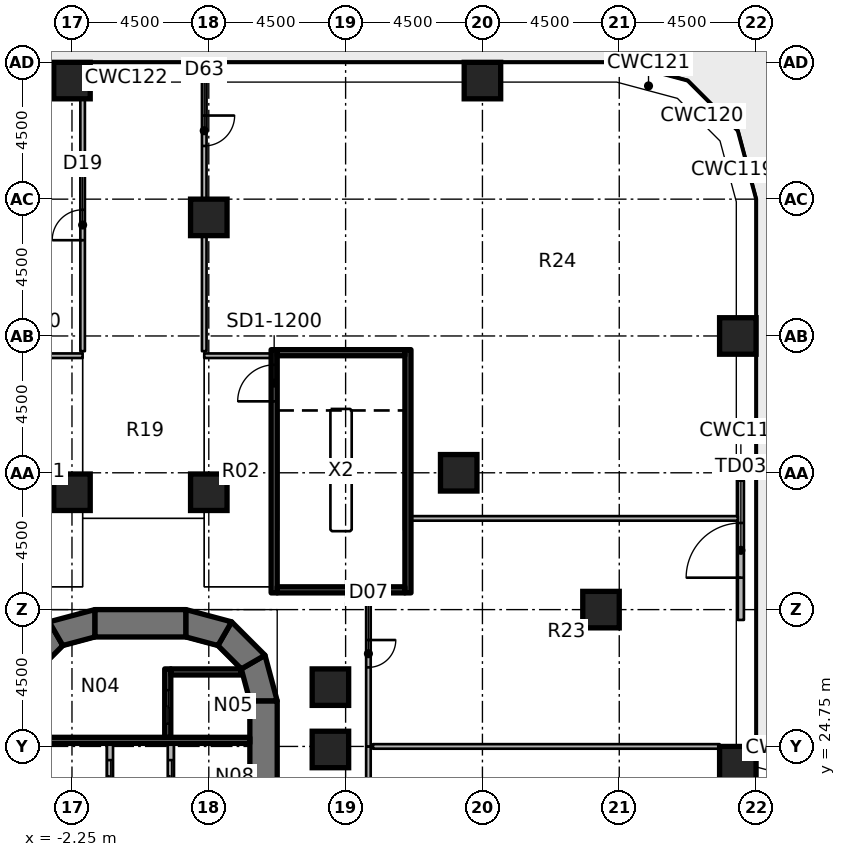
"""IFC4 building model, lengths in metres.
Left out: names, types, materials, properties, quantities, classifications, styles, units other than length and angle.
Written with IfcOpenShell. Run it as: python <this file> out.ifc"""

import sys

from ifc_helpers import new_model, si_unit, direction, frame, frame_2d, origin, origin_2d, place, context, subcontext, project, spatial, polyline, rectangle, outline, extrude, element, fill, save


model = new_model("IFC4")
c1 = context("Model", 3, precision=1e-05, world=origin(), true_north=direction((0.0, 1.0)))
c2 = subcontext(c1, "Body", "Model", "MODEL_VIEW")
j1 = project(units=[si_unit("LENGTHUNIT", "METRE"), si_unit("PLANEANGLEUNIT", "RADIAN")], contexts=[c1])
p1 = place(None, origin())
s1 = spatial("IfcSite", under=j1, at=p1, CompositionType="ELEMENT")
p2 = place(p1, origin())
s2 = spatial("IfcBuilding", under=s1, at=p2, CompositionType="ELEMENT")
p3 = place(p2, frame((0.0, 0.0, 12.0)))
s3 = spatial("IfcBuildingStorey", under=s2, at=p3, CompositionType="ELEMENT", Elevation=12.0)
for number, where, z_axis, x_axis in (
    (1, (-2.25, 33.11, 0.0), (0.0, 0.0, 1.0), (1.0, 0.0, 0.0)),
    (2, (-2.25, 46.65, 0.0), (0.0, 0.0, 1.0), (1.0, 0.0, 0.0)),
    (3, (2.25, 33.11, 0.0), (0.0, 0.0, 1.0), (1.0, 0.0, 0.0)),
    (4, (2.25, 42.15, 0.0), (0.0, 0.0, 1.0), (1.0, 0.0, 0.0)),
    (5, (6.25, 24.65, 0.0), (0.0, 0.0, 1.0), (1.0, 0.0, 0.0)),
    (6, (6.25, 26.7, 0.0), (0.0, 0.0, 1.0), (1.0, 0.0, 0.0)),
    (7, (10.47, 33.75, 0.0), (0.0, 0.0, 1.0), (1.0, 0.0, 0.0)),
    (8, (11.25, 46.65, 0.0), (0.0, 0.0, 1.0), (1.0, 0.0, 0.0)),
    (9, (15.15, 29.25, 0.0), (0.0, 0.0, 1.0), (1.0, 0.0, 0.0)),
    (10, (19.65, 24.15, 0.0), (0.0, 0.0, 1.0), (1.0, 0.0, 0.0)),
    (11, (19.65, 38.25, 0.0), (0.0, 0.0, 1.0), (1.0, 0.0, 0.0)),
):
    element("IfcColumn", number, at=place(p3, frame(where, z_axis=z_axis, x_axis=x_axis)), inside=s3, PredefinedType="COLUMN", context=c2, shape_type="SweptSolid", body=[
        extrude(rectangle(XDim=1.2, YDim=1.2, at=origin_2d()), origin(), (0.0, 0.0, 1.0), 4.55),
    ])
p4 = place(p3, frame((4.05, 11.25, 0.0), z_axis=(0.0, 0.0, 1.0), x_axis=(0.0, 1.0, 0.0)))
e12 = element("IfcWall", 12, at=p4, inside=s3, PredefinedType="SHEAR", context=c2, shape_type="SweptSolid", body=[
    extrude(rectangle(XDim=15.0, YDim=0.9, at=frame_2d((7.5, 0.0))), origin(), (0.0, 0.0, 1.0), 5.0),
])
p5 = place(p4, frame((7.15, 0.0, 0.0)))
e13 = element("IfcOpeningElement", 13, at=p5, cuts=e12, PredefinedType="OPENING", context=c2, shape_type="SweptSolid", body=[
    extrude(rectangle(XDim=1.5, YDim=2.3, at=frame_2d((0.75, 1.15))), frame((0.0, 0.46, 0.0), z_axis=(0.0, -1.0, 0.0), x_axis=(1.0, 0.0, 0.0)), (0.0, 0.0, 1.0), 0.92),
])
p6 = place(p4, frame((5.55, 0.0, 0.0)))
e14 = element("IfcOpeningElement", 14, at=p6, cuts=e12, PredefinedType="OPENING", context=c2, shape_type="SweptSolid", body=[
    extrude(rectangle(XDim=1.2, YDim=2.1, at=frame_2d((0.6, 1.05))), frame((0.0, 0.46, 0.0), z_axis=(0.0, -1.0, 0.0), x_axis=(1.0, 0.0, 0.0)), (0.0, 0.0, 1.0), 0.92),
])
p7 = place(p3, frame((-1.5, 28.8, 0.0), z_axis=(0.0, 0.0, 1.0), x_axis=(1.0, 0.0, 0.0)))
e15 = element("IfcWall", 15, at=p7, inside=s3, PredefinedType="SHEAR", context=c2, shape_type="SweptSolid", body=[
    extrude(rectangle(XDim=3.0, YDim=0.9, at=frame_2d((1.5, 0.0))), origin(), (0.0, 0.0, 1.0), 5.0),
])
p8 = place(p3, origin())
e16 = element("IfcWall", 16, at=p8, inside=s3, PredefinedType="SHEAR", context=c2, shape_type="SweptSolid", body=[
    extrude(outline(polyline([(-4.098, 27.75), (-3.0, 28.848), (-2.55, 28.069), (-3.319, 27.3), (-4.098, 27.75)])), origin(), (0.0, 0.0, 1.0), 5.0),
])
p9 = place(p3, origin())
e17 = element("IfcWall", 17, at=p9, inside=s3, PredefinedType="SHEAR", context=c2, shape_type="SweptSolid", body=[
    extrude(outline(polyline([(-3.0, 28.848), (-1.5, 29.25), (-1.5, 28.35), (-2.55, 28.069), (-3.0, 28.848)])), origin(), (0.0, 0.0, 1.0), 5.0),
])
p10 = place(p3, origin())
e18 = element("IfcWall", 18, at=p10, inside=s3, PredefinedType="SHEAR", context=c2, shape_type="SweptSolid", body=[
    extrude(outline(polyline([(4.5, 26.25), (4.098, 27.75), (3.319, 27.3), (3.6, 26.25), (4.5, 26.25)])), origin(), (0.0, 0.0, 1.0), 5.0),
])
p11 = place(p3, origin())
e19 = element("IfcWall", 19, at=p11, inside=s3, PredefinedType="SHEAR", context=c2, shape_type="SweptSolid", body=[
    extrude(outline(polyline([(4.098, 27.75), (3.0, 28.848), (2.55, 28.069), (3.319, 27.3), (4.098, 27.75)])), origin(), (0.0, 0.0, 1.0), 5.0),
])
p12 = place(p3, origin())
e20 = element("IfcWall", 20, at=p12, inside=s3, PredefinedType="SHEAR", context=c2, shape_type="SweptSolid", body=[
    extrude(outline(polyline([(3.0, 28.848), (1.5, 29.25), (1.5, 28.35), (2.55, 28.069), (3.0, 28.848)])), origin(), (0.0, 0.0, 1.0), 5.0),
])
p13 = place(p3, frame((19.75, 28.91, 0.0), z_axis=(0.0, 0.0, 1.0), x_axis=(0.0, 1.0, 0.0)))
e21 = element("IfcWall", 21, at=p13, inside=s3, PredefinedType="SOLIDWALL", context=c2, shape_type="SweptSolid", body=[
    extrude(rectangle(XDim=4.58, YDim=0.2, at=frame_2d((2.29, 0.0))), origin(), (0.0, 0.0, 1.0), 4.55),
])
p14 = place(p13, frame((1.39, 0.0, 0.0)))
e22 = element("IfcOpeningElement", 22, at=p14, cuts=e21, PredefinedType="OPENING", context=c2, shape_type="SweptSolid", body=[
    extrude(rectangle(XDim=1.8, YDim=2.4, at=frame_2d((0.9, 1.2))), frame((0.0, 0.11, 0.0), z_axis=(0.0, -1.0, 0.0), x_axis=(1.0, 0.0, 0.0)), (0.0, 0.0, 1.0), 0.22),
])
p15 = place(p3, frame((-3.6, 24.95, 0.0), z_axis=(0.0, 0.0, 1.0), x_axis=(1.0, 0.0, 0.0)))
e23 = element("IfcWall", 23, at=p15, inside=s3, PredefinedType="SHEAR", context=c2, shape_type="SweptSolid", body=[
    extrude(rectangle(XDim=7.2, YDim=0.2, at=frame_2d((3.6, 0.0))), origin(), (0.0, 0.0, 1.0), 4.55),
])
p16 = place(p3, frame((0.9, 27.3, 0.0), z_axis=(0.0, 0.0, 1.0), x_axis=(0.0, -1.0, 0.0)))
e24 = element("IfcWall", 24, at=p16, inside=s3, PredefinedType="SHEAR", context=c2, shape_type="SweptSolid", body=[
    extrude(rectangle(XDim=2.25, YDim=0.2, at=frame_2d((1.125, 0.0))), origin(), (0.0, 0.0, 1.0), 4.55),
])
p17 = place(p16, frame((0.7, 0.0, 0.0)))
e25 = element("IfcOpeningElement", 25, at=p17, cuts=e24, PredefinedType="OPENING", context=c2, shape_type="SweptSolid", body=[
    extrude(rectangle(XDim=1.1, YDim=2.3, at=frame_2d((0.55, 1.15))), frame((0.0, 0.11, 0.0), z_axis=(0.0, -1.0, 0.0), x_axis=(1.0, 0.0, 0.0)), (0.0, 0.0, 1.0), 0.22),
])
p18 = place(p3, origin())
e26 = element("IfcWall", 26, at=p18, inside=s3, PredefinedType="SHEAR", context=c2, shape_type="SweptSolid", body=[
    extrude(outline(polyline([(1.0, 27.1), (3.341, 27.1), (3.291, 27.284), (3.275, 27.3), (1.0, 27.3), (1.0, 27.1)])), origin(), (0.0, 0.0, 1.0), 4.55),
])
p19 = place(p3, frame((-1.0, 24.85, 0.0), z_axis=(0.0, 0.0, 1.0), x_axis=(0.0, -1.0, 0.0)))
e27 = element("IfcWall", 27, at=p19, inside=s3, PredefinedType="PARTITIONING", context=c2, shape_type="SweptSolid", body=[
    extrude(rectangle(XDim=4.6, YDim=0.2, at=frame_2d((2.3, 0.0))), origin(), (0.0, 0.0, 1.0), 4.55),
])
p20 = place(p19, frame((0.55, 0.0, 0.0)))
e28 = element("IfcOpeningElement", 28, at=p20, cuts=e27, PredefinedType="OPENING", context=c2, shape_type="SweptSolid", body=[
    extrude(rectangle(XDim=1.1, YDim=2.3, at=frame_2d((0.55, 1.15))), frame((0.0, 0.11, 0.0), z_axis=(0.0, -1.0, 0.0), x_axis=(1.0, 0.0, 0.0)), (0.0, 0.0, 1.0), 0.22),
])
p21 = place(p19, frame((2.95, 0.0, 0.0)))
e29 = element("IfcOpeningElement", 29, at=p21, cuts=e27, PredefinedType="OPENING", context=c2, shape_type="SweptSolid", body=[
    extrude(rectangle(XDim=1.1, YDim=2.3, at=frame_2d((0.55, 1.15))), frame((0.0, 0.11, 0.0), z_axis=(0.0, -1.0, 0.0), x_axis=(1.0, 0.0, 0.0)), (0.0, 0.0, 1.0), 0.22),
])
p22 = place(p3, frame((1.0, 24.85, 0.0), z_axis=(0.0, 0.0, 1.0), x_axis=(0.0, -1.0, 0.0)))
e30 = element("IfcWall", 30, at=p22, inside=s3, PredefinedType="PARTITIONING", context=c2, shape_type="SweptSolid", body=[
    extrude(rectangle(XDim=4.6, YDim=0.2, at=frame_2d((2.3, 0.0))), origin(), (0.0, 0.0, 1.0), 4.55),
])
p23 = place(p22, frame((0.55, 0.0, 0.0)))
e31 = element("IfcOpeningElement", 31, at=p23, cuts=e30, PredefinedType="OPENING", context=c2, shape_type="SweptSolid", body=[
    extrude(rectangle(XDim=1.1, YDim=2.3, at=frame_2d((0.55, 1.15))), frame((0.0, 0.11, 0.0), z_axis=(0.0, -1.0, 0.0), x_axis=(1.0, 0.0, 0.0)), (0.0, 0.0, 1.0), 0.22),
])
p24 = place(p22, frame((3.05, 0.0, 0.0)))
e32 = element("IfcOpeningElement", 32, at=p24, cuts=e30, PredefinedType="OPENING", context=c2, shape_type="SweptSolid", body=[
    extrude(rectangle(XDim=0.9, YDim=2.1, at=frame_2d((0.45, 1.05))), frame((0.0, 0.11, 0.0), z_axis=(0.0, -1.0, 0.0), x_axis=(1.0, 0.0, 0.0)), (0.0, 0.0, 1.0), 0.22),
])
p25 = place(p3, frame((4.4, 29.8, 0.0), z_axis=(0.0, 0.0, 1.0), x_axis=(0.0, 1.0, 0.0)))
e33 = element("IfcWall", 33, at=p25, inside=s3, PredefinedType="SHEAR", context=c2, shape_type="SweptSolid", body=[
    extrude(rectangle(XDim=8.0, YDim=0.2, at=frame_2d((4.0, 0.0))), origin(), (0.0, 0.0, 1.0), 4.55),
])
p26 = place(p25, frame((6.3, 0.0, 0.0)))
e34 = element("IfcOpeningElement", 34, at=p26, cuts=e33, PredefinedType="OPENING", context=c2, shape_type="SweptSolid", body=[
    extrude(rectangle(XDim=1.2, YDim=2.1, at=frame_2d((0.6, 1.05))), frame((0.0, 0.11, 0.0), z_axis=(0.0, -1.0, 0.0), x_axis=(1.0, 0.0, 0.0)), (0.0, 0.0, 1.0), 0.22),
])
p27 = place(p3, frame((8.8, 29.8, 0.0), z_axis=(0.0, 0.0, 1.0), x_axis=(0.0, 1.0, 0.0)))
e35 = element("IfcWall", 35, at=p27, inside=s3, PredefinedType="SHEAR", context=c2, shape_type="SweptSolid", body=[
    extrude(rectangle(XDim=8.0, YDim=0.2, at=frame_2d((4.0, 0.0))), origin(), (0.0, 0.0, 1.0), 4.55),
])
for number, where, z_axis, x_axis in (
    (36, (4.5, 29.9, 0.0), (0.0, 0.0, 1.0), (1.0, 0.0, 0.0)),
    (37, (4.5, 37.7, 0.0), (0.0, 0.0, 1.0), (1.0, 0.0, 0.0)),
):
    element("IfcWall", number, at=place(p3, frame(where, z_axis=z_axis, x_axis=x_axis)), inside=s3, PredefinedType="SHEAR", context=c2, shape_type="SweptSolid", body=[
        extrude(rectangle(XDim=4.2, YDim=0.2, at=frame_2d((2.1, 0.0))), origin(), (0.0, 0.0, 1.0), 4.55),
    ])
p28 = place(p3, frame((-4.1, 37.6, 0.0), z_axis=(0.0, 0.0, 1.0), x_axis=(1.0, 0.0, 0.0)))
e38 = element("IfcWall", 38, at=p28, inside=s3, PredefinedType="PARTITIONING", context=c2, shape_type="SweptSolid", body=[
    extrude(rectangle(XDim=2.2, YDim=0.15, at=frame_2d((1.1, 0.0))), origin(), (0.0, 0.0, 1.0), 4.55),
])
p29 = place(p3, frame((2.1, 37.6, 0.0), z_axis=(0.0, 0.0, 1.0), x_axis=(1.0, 0.0, 0.0)))
e39 = element("IfcWall", 39, at=p29, inside=s3, PredefinedType="PARTITIONING", context=c2, shape_type="SweptSolid", body=[
    extrude(rectangle(XDim=2.2, YDim=0.15, at=frame_2d((1.1, 0.0))), origin(), (0.0, 0.0, 1.0), 4.55),
])
p30 = place(p3, frame((7.5, 24.75, 0.0), z_axis=(0.0, 0.0, 1.0), x_axis=(0.0, -1.0, 0.0)))
e40 = element("IfcWall", 40, at=p30, inside=s3, PredefinedType="PARTITIONING", context=c2, shape_type="SweptSolid", body=[
    extrude(rectangle(XDim=16.5, YDim=0.15, at=frame_2d((8.25, 0.0))), origin(), (0.0, 0.0, 1.0), 4.55),
])
p31 = place(p30, frame((10.5, 0.0, 0.0)))
e41 = element("IfcOpeningElement", 41, at=p31, cuts=e40, PredefinedType="OPENING", context=c2, shape_type="SweptSolid", body=[
    extrude(rectangle(XDim=1.0, YDim=2.1, at=frame_2d((0.5, 1.05))), frame((0.0, 0.085, 0.0), z_axis=(0.0, -1.0, 0.0), x_axis=(1.0, 0.0, 0.0)), (0.0, 0.0, 1.0), 0.17),
])
p32 = place(p3, frame((7.5, 30.0, 0.0), z_axis=(0.0, 0.0, 1.0), x_axis=(0.0, -1.0, 0.0)))
e42 = element("IfcWall", 42, at=p32, inside=s3, PredefinedType="PARTITIONING", context=c2, shape_type="SweptSolid", body=[
    extrude(rectangle(XDim=5.25, YDim=0.15, at=frame_2d((2.625, 0.0))), origin(), (0.0, 0.0, 1.0), 4.55),
])
p33 = place(p32, frame((1.75, 0.0, 0.0)))
e43 = element("IfcOpeningElement", 43, at=p33, cuts=e42, PredefinedType="OPENING", context=c2, shape_type="SweptSolid", body=[
    extrude(rectangle(XDim=0.9, YDim=2.1, at=frame_2d((0.45, 1.05))), frame((0.0, 0.085, 0.0), z_axis=(0.0, -1.0, 0.0), x_axis=(1.0, 0.0, 0.0)), (0.0, 0.0, 1.0), 0.17),
])
p34 = place(p3, frame((2.1, 46.65, 0.0), z_axis=(0.0, 0.0, 1.0), x_axis=(0.0, -1.0, 0.0)))
e44 = element("IfcWall", 44, at=p34, inside=s3, PredefinedType="PARTITIONING", context=c2, shape_type="SweptSolid", body=[
    extrude(rectangle(XDim=3.9, YDim=0.15, at=frame_2d((1.95, 0.0))), origin(), (0.0, 0.0, 1.0), 4.55),
])
p35 = place(p34, frame((1.15, 0.0, 0.0)))
e45 = element("IfcOpeningElement", 45, at=p35, cuts=e44, PredefinedType="OPENING", context=c2, shape_type="SweptSolid", body=[
    extrude(rectangle(XDim=1.0, YDim=2.1, at=frame_2d((0.5, 1.05))), frame((0.0, 0.085, 0.0), z_axis=(0.0, -1.0, 0.0), x_axis=(1.0, 0.0, 0.0)), (0.0, 0.0, 1.0), 0.17),
])
p36 = place(p3, frame((2.1, 41.55, 0.0), z_axis=(0.0, 0.0, 1.0), x_axis=(0.0, -1.0, 0.0)))
e46 = element("IfcWall", 46, at=p36, inside=s3, PredefinedType="PARTITIONING", context=c2, shape_type="SweptSolid", body=[
    extrude(rectangle(XDim=3.8, YDim=0.15, at=frame_2d((1.9, 0.0))), origin(), (0.0, 0.0, 1.0), 4.55),
])
p37 = place(p3, frame((-1.9, 37.75, 0.0), z_axis=(0.0, 0.0, 1.0), x_axis=(0.0, 1.0, 0.0)))
e47 = element("IfcWall", 47, at=p37, inside=s3, PredefinedType="PARTITIONING", context=c2, shape_type="SweptSolid", body=[
    extrude(rectangle(XDim=8.3, YDim=0.15, at=frame_2d((4.15, 0.0))), origin(), (0.0, 0.0, 1.0), 4.55),
])
p38 = place(p37, frame((3.65, 0.0, 0.0)))
e48 = element("IfcOpeningElement", 48, at=p38, cuts=e47, PredefinedType="OPENING", context=c2, shape_type="SweptSolid", body=[
    extrude(rectangle(XDim=1.0, YDim=2.1, at=frame_2d((0.5, 1.05))), frame((0.0, 0.085, 0.0), z_axis=(0.0, -1.0, 0.0), x_axis=(1.0, 0.0, 0.0)), (0.0, 0.0, 1.0), 0.17),
])
p39 = place(p3, frame((7.65, 24.75, 0.0), z_axis=(0.0, 0.0, 1.0), x_axis=(1.0, 0.0, 0.0)))
e49 = element("IfcWall", 49, at=p39, inside=s3, PredefinedType="PARTITIONING", context=c2, shape_type="SweptSolid", body=[
    extrude(rectangle(XDim=11.4, YDim=0.15, at=frame_2d((5.7, 0.0))), origin(), (0.0, 0.0, 1.0), 4.55),
])
p40 = place(p3, frame((8.9, 32.25, 0.0), z_axis=(0.0, 0.0, 1.0), x_axis=(1.0, 0.0, 0.0)))
e50 = element("IfcWall", 50, at=p40, inside=s3, PredefinedType="PARTITIONING", context=c2, shape_type="SweptSolid", body=[
    extrude(rectangle(XDim=10.75, YDim=0.15, at=frame_2d((5.375, 0.0))), origin(), (0.0, 0.0, 1.0), 4.55),
])
p41 = place(p14, origin())
e51 = element("IfcDoor", 51, at=p41, inside=s3, OperationType="SINGLE_SWING_LEFT", PredefinedType="DOOR", context=c2, shape_type="SweptSolid", body=[
    extrude(rectangle(XDim=1.8, YDim=2.4, at=frame_2d((0.9, 1.2))), frame((0.0, 0.025, 0.0), z_axis=(0.0, -1.0, 0.0), x_axis=(1.0, 0.0, 0.0)), (0.0, 0.0, 1.0), 0.05),
])
fill(e22, e51)
p42 = place(p17, origin())
e52 = element("IfcDoor", 52, at=p42, inside=s3, OperationType="DOUBLE_DOOR_SLIDING", PredefinedType="DOOR", context=c2, shape_type="SweptSolid", body=[
    extrude(rectangle(XDim=1.1, YDim=2.3, at=frame_2d((0.55, 1.15))), frame((0.0, 0.025, 0.0), z_axis=(0.0, -1.0, 0.0), x_axis=(1.0, 0.0, 0.0)), (0.0, 0.0, 1.0), 0.05),
])
fill(e25, e52)
p43 = place(p20, origin())
e53 = element("IfcDoor", 53, at=p43, inside=s3, OperationType="DOUBLE_DOOR_SLIDING", PredefinedType="DOOR", context=c2, shape_type="SweptSolid", body=[
    extrude(rectangle(XDim=1.1, YDim=2.3, at=frame_2d((0.55, 1.15))), frame((0.0, 0.025, 0.0), z_axis=(0.0, -1.0, 0.0), x_axis=(1.0, 0.0, 0.0)), (0.0, 0.0, 1.0), 0.05),
])
fill(e28, e53)
p44 = place(p23, origin())
e54 = element("IfcDoor", 54, at=p44, inside=s3, OperationType="DOUBLE_DOOR_SLIDING", PredefinedType="DOOR", context=c2, shape_type="SweptSolid", body=[
    extrude(rectangle(XDim=1.1, YDim=2.3, at=frame_2d((0.55, 1.15))), frame((0.0, 0.025, 0.0), z_axis=(0.0, -1.0, 0.0), x_axis=(1.0, 0.0, 0.0)), (0.0, 0.0, 1.0), 0.05),
])
fill(e31, e54)
p45 = place(p26, origin())
e55 = element("IfcDoor", 55, at=p45, inside=s3, OperationType="SINGLE_SWING_LEFT", PredefinedType="DOOR", context=c2, shape_type="SweptSolid", body=[
    extrude(rectangle(XDim=1.2, YDim=2.1, at=frame_2d((0.6, 1.05))), frame((0.0, 0.025, 0.0), z_axis=(0.0, -1.0, 0.0), x_axis=(1.0, 0.0, 0.0)), (0.0, 0.0, 1.0), 0.05),
])
fill(e34, e55)
p46 = place(p33, origin())
e56 = element("IfcDoor", 56, at=p46, inside=s3, OperationType="SINGLE_SWING_LEFT", PredefinedType="DOOR", context=c2, shape_type="SweptSolid", body=[
    extrude(rectangle(XDim=0.9, YDim=2.1, at=frame_2d((0.45, 1.05))), frame((0.0, 0.025, 0.0), z_axis=(0.0, -1.0, 0.0), x_axis=(1.0, 0.0, 0.0)), (0.0, 0.0, 1.0), 0.05),
])
fill(e43, e56)
p47 = place(p35, origin())
e57 = element("IfcDoor", 57, at=p47, inside=s3, OperationType="SINGLE_SWING_LEFT", PredefinedType="DOOR", context=c2, shape_type="SweptSolid", body=[
    extrude(rectangle(XDim=1.0, YDim=2.1, at=frame_2d((0.5, 1.05))), frame((0.0, 0.025, 0.0), z_axis=(0.0, -1.0, 0.0), x_axis=(1.0, 0.0, 0.0)), (0.0, 0.0, 1.0), 0.05),
])
fill(e45, e57)
p48 = place(p38, origin())
e58 = element("IfcDoor", 58, at=p48, inside=s3, OperationType="SINGLE_SWING_LEFT", PredefinedType="DOOR", context=c2, shape_type="SweptSolid", body=[
    extrude(rectangle(XDim=1.0, YDim=2.1, at=frame_2d((0.5, 1.05))), frame((0.0, 0.025, 0.0), z_axis=(0.0, -1.0, 0.0), x_axis=(1.0, 0.0, 0.0)), (0.0, 0.0, 1.0), 0.05),
])
fill(e48, e58)
save(model, sys.argv[1])
